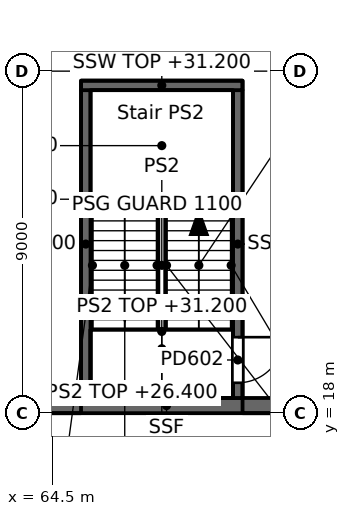
"""IFC4 building model, lengths in metres.
Left out: names, types, materials, properties, quantities, classifications, styles, units other than length and angle.
Written with IfcOpenShell. Run it as: python <this file> out.ifc"""

import sys

from ifc_helpers import new_model, si_unit, direction, frame, frame_2d, origin, place, context, subcontext, project, spatial, rectangle, extrude, element, fill, save


model = new_model("IFC4")
c1 = context("Model", 3, precision=1e-05, world=origin(), true_north=direction((0.0, 1.0)))
c2 = subcontext(c1, "Body", "Model", "MODEL_VIEW")
j1 = project(units=[si_unit("LENGTHUNIT", "METRE"), si_unit("PLANEANGLEUNIT", "RADIAN")], contexts=[c1])
p1 = place(None, origin())
s1 = spatial("IfcSite", under=j1, at=p1, CompositionType="ELEMENT")
p2 = place(p1, origin())
s2 = spatial("IfcBuilding", under=s1, at=p2, CompositionType="ELEMENT")
p3 = place(p2, frame((0.0, 0.0, 26.4)))
s3 = spatial("IfcBuildingStorey", under=s2, at=p3, CompositionType="ELEMENT", Elevation=26.4)
p4 = place(p3, frame((65.375, 18.4, 0.0), z_axis=(0.0, 0.0, 1.0), x_axis=(0.0, 1.0, 0.0)))
e1 = element("IfcWall", 1, at=p4, inside=s3, PredefinedType="SOLIDWALL", context=c2, shape_type="SweptSolid", body=[
    extrude(rectangle(XDim=8.1, YDim=0.25, at=frame_2d((4.05, 0.0))), origin(), (0.0, 0.0, 1.0), 4.8),
])
p5 = place(p3, frame((69.375, 26.5, 0.0), z_axis=(0.0, 0.0, 1.0), x_axis=(0.0, -1.0, 0.0)))
e2 = element("IfcWall", 2, at=p5, inside=s3, PredefinedType="SOLIDWALL", context=c2, shape_type="SweptSolid", body=[
    extrude(rectangle(XDim=8.1, YDim=0.25, at=frame_2d((4.05, 0.0))), origin(), (0.0, 0.0, 1.0), 4.8),
])
p6 = place(p5, frame((6.5, 0.0, 0.0)))
e3 = element("IfcOpeningElement", 3, at=p6, cuts=e2, PredefinedType="OPENING", context=c2, shape_type="SweptSolid", body=[
    extrude(rectangle(XDim=1.2, YDim=2.1, at=frame_2d((0.6, 1.05))), frame((0.0, 0.125, 0.0), z_axis=(0.0, -1.0, 0.0), x_axis=(1.0, 0.0, 0.0)), (0.0, 0.0, 1.0), 0.25),
])
p7 = place(p3, frame((65.25, 26.625, 0.0), z_axis=(0.0, 0.0, 1.0), x_axis=(1.0, 0.0, 0.0)))
e4 = element("IfcWall", 4, at=p7, inside=s3, PredefinedType="SOLIDWALL", context=c2, shape_type="SweptSolid", body=[
    extrude(rectangle(XDim=4.25, YDim=0.25, at=frame_2d((2.125, 0.0))), origin(), (0.0, 0.0, 1.0), 4.8),
])
p8 = place(p3, frame((71.25, 18.2, 0.0), z_axis=(0.0, 0.0, 1.0), x_axis=(-1.0, 0.0, 0.0)))
e5 = element("IfcWall", 5, at=p8, inside=s3, PredefinedType="SOLIDWALL", context=c2, shape_type="SweptSolid", body=[
    extrude(rectangle(XDim=7.5, YDim=0.4, at=frame_2d((3.75, 0.0))), origin(), (0.0, 0.0, 1.0), 4.35),
])
p9 = place(p6, origin())
e6 = element("IfcDoor", 6, at=p9, inside=s3, OperationType="SINGLE_SWING_LEFT", PredefinedType="DOOR", context=c2, shape_type="SweptSolid", body=[
    extrude(rectangle(XDim=1.2, YDim=2.1, at=frame_2d((0.6, 1.05))), frame((0.0, 0.025, 0.0), z_axis=(0.0, -1.0, 0.0), x_axis=(1.0, 0.0, 0.0)), (0.0, 0.0, 1.0), 0.05),
])
fill(e3, e6)
save(model, sys.argv[1])
